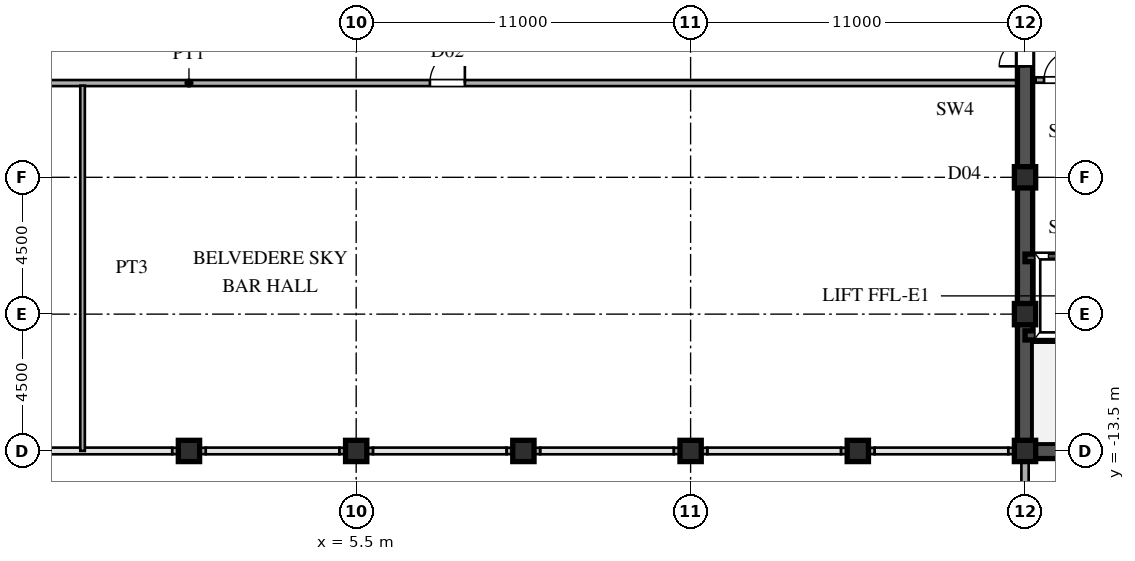
"""IFC4 building model, lengths in metres.
Left out: names, types, materials, properties, quantities, classifications, styles, units other than length and angle.
Written with IfcOpenShell. Run it as: python <this file> out.ifc"""

import sys

from ifc_helpers import new_model, si_unit, direction, frame, frame_2d, origin, origin_2d, place, context, subcontext, project, spatial, rectangle, hollow_rectangle, extrude, source, transform, mapped, element, fill, save


model = new_model("IFC4")
c1 = context("Model", 3, precision=1e-05, world=origin(), true_north=direction((0.0, 1.0)))
c2 = subcontext(c1, "Body", "Model", "MODEL_VIEW")
j1 = project(units=[si_unit("LENGTHUNIT", "METRE"), si_unit("PLANEANGLEUNIT", "RADIAN")], contexts=[c1])
p1 = place(None, origin())
s1 = spatial("IfcSite", under=j1, at=p1, CompositionType="ELEMENT")
p2 = place(p1, origin())
s2 = spatial("IfcBuilding", under=s1, at=p2, CompositionType="ELEMENT")
p3 = place(p2, frame((0.0, 0.0, 274.2)))
s3 = spatial("IfcBuildingStorey", under=s2, at=p3, CompositionType="ELEMENT", Elevation=274.2)
m1 = source(origin(), c2, "Body", "SweptSolid", [
    extrude(hollow_rectangle(XDim=0.7, YDim=0.7, WallThickness=0.03, at=origin_2d()), origin(), (0.0, 0.0, 1.0), 4.8),
])
for number, where, z_axis, x_axis in (
    (1, (27.5, -13.5, 0.0), (0.0, 0.0, 1.0), (1.0, 0.0, 0.0)),
    (2, (27.5, -9.0, 0.0), (0.0, 0.0, 1.0), (1.0, 0.0, 0.0)),
    (3, (27.5, -4.5, 0.0), (0.0, 0.0, 1.0), (1.0, 0.0, 0.0)),
    (4, (0.0, -13.5, 0.0), (0.0, 0.0, 1.0), (1.0, 0.0, 0.0)),
    (5, (5.5, -13.5, 0.0), (0.0, 0.0, 1.0), (1.0, 0.0, 0.0)),
    (6, (11.0, -13.5, 0.0), (0.0, 0.0, 1.0), (1.0, 0.0, 0.0)),
    (7, (16.5, -13.5, 0.0), (0.0, 0.0, 1.0), (1.0, 0.0, 0.0)),
    (8, (22.0, -13.5, 0.0), (0.0, 0.0, 1.0), (1.0, 0.0, 0.0)),
):
    element("IfcColumn", number, at=place(p3, frame(where, z_axis=z_axis, x_axis=x_axis)), inside=s3, PredefinedType="COLUMN", context=c2, shape_type="MappedRepresentation", body=[
        mapped(m1, transform((0.0, 0.0, 0.0), scale=1.0)),
    ])
p4 = place(p3, frame((27.5, -15.98, 0.0), z_axis=(0.0, 0.0, 1.0), x_axis=(0.0, 1.0, 0.0)))
e9 = element("IfcWall", 9, at=p4, inside=s3, PredefinedType="SOLIDWALL", context=c2, shape_type="SweptSolid", body=[
    extrude(rectangle(XDim=1.605, YDim=0.24, at=frame_2d((0.803, 0.0))), origin(), (0.0, 0.0, 1.0), 4.52),
])
p5 = place(p3, frame((27.5, -14.375, 0.0), z_axis=(0.0, 0.0, 1.0), x_axis=(0.0, 1.0, 0.0)))
e10 = element("IfcWall", 10, at=p5, inside=s3, PredefinedType="SOLIDWALL", context=c2, shape_type="SweptSolid", body=[
    extrude(rectangle(XDim=0.62, YDim=0.24, at=frame_2d((0.31, 0.0))), origin(), (0.0, 0.0, 1.0), 4.02),
])
for number, where, z_axis, x_axis in (
    (11, (-0.55, -13.5, 0.0), (0.0, 0.0, 1.0), (1.0, 0.0, 0.0)),
    (12, (4.95, -13.5, 0.0), (0.0, 0.0, 1.0), (1.0, 0.0, 0.0)),
    (13, (10.45, -13.5, 0.0), (0.0, 0.0, 1.0), (1.0, 0.0, 0.0)),
    (14, (15.95, -13.5, 0.0), (0.0, 0.0, 1.0), (1.0, 0.0, 0.0)),
    (15, (21.45, -13.5, 0.0), (0.0, 0.0, 1.0), (1.0, 0.0, 0.0)),
):
    element("IfcWall", number, at=place(p3, frame(where, z_axis=z_axis, x_axis=x_axis)), inside=s3, PredefinedType="SOLIDWALL", context=c2, shape_type="SweptSolid", body=[
        extrude(rectangle(XDim=1.1, YDim=0.21, at=frame_2d((0.55, 0.0))), origin(), (0.0, 0.0, 1.0), 4.02),
    ])
p6 = place(p3, frame((26.95, -13.5, 0.0), z_axis=(0.0, 0.0, 1.0), x_axis=(1.0, 0.0, 0.0)))
e16 = element("IfcWall", 16, at=p6, inside=s3, PredefinedType="SOLIDWALL", context=c2, shape_type="SweptSolid", body=[
    extrude(rectangle(XDim=0.54, YDim=0.21, at=frame_2d((0.27, 0.0))), origin(), (0.0, 0.0, 1.0), 4.02),
])
p7 = place(p3, frame((27.5, -13.5, 0.0), z_axis=(0.0, 0.0, 1.0), x_axis=(0.0, 1.0, 0.0)))
e17 = element("IfcWall", 17, at=p7, inside=s3, PredefinedType="SHEAR", context=c2, shape_type="SweptSolid", body=[
    extrude(rectangle(XDim=12.2, YDim=0.5, at=frame_2d((6.1, 0.0))), origin(), (0.0, 0.0, 1.0), 4.52),
])
p8 = place(p3, frame((27.5, -1.3, 0.0), z_axis=(0.0, 0.0, 1.0), x_axis=(0.0, 1.0, 0.0)))
e18 = element("IfcWall", 18, at=p8, inside=s3, PredefinedType="SHEAR", context=c2, shape_type="SweptSolid", body=[
    extrude(rectangle(XDim=2.6, YDim=0.5, at=frame_2d((1.3, 0.0))), origin(), (0.0, 0.0, 1.0), 4.52),
])
p9 = place(p8, frame((0.45, 0.0, 0.0)))
e19 = element("IfcOpeningElement", 19, at=p9, cuts=e18, PredefinedType="OPENING", context=c2, shape_type="SweptSolid", body=[
    extrude(rectangle(XDim=1.7, YDim=2.35, at=frame_2d((0.85, 1.175))), frame((0.0, 0.26, 0.0), z_axis=(0.0, -1.0, 0.0), x_axis=(1.0, 0.0, 0.0)), (0.0, 0.0, 1.0), 0.52),
])
p10 = place(p3, frame((27.5, -13.5, 0.0), z_axis=(0.0, 0.0, 1.0), x_axis=(1.0, 0.0, 0.0)))
e20 = element("IfcWall", 20, at=p10, inside=s3, PredefinedType="SHEAR", context=c2, shape_type="SweptSolid", body=[
    extrude(rectangle(XDim=9.0, YDim=0.5, at=frame_2d((4.5, 0.0))), origin(), (0.0, 0.0, 1.0), 4.52),
])
p11 = place(p3, frame((27.5, -9.7, 0.0), z_axis=(0.0, 0.0, 1.0), x_axis=(1.0, 0.0, 0.0)))
e21 = element("IfcWall", 21, at=p11, inside=s3, PredefinedType="SHEAR", context=c2, shape_type="SweptSolid", body=[
    extrude(rectangle(XDim=9.0, YDim=0.3, at=frame_2d((4.5, 0.0))), origin(), (0.0, 0.0, 1.0), 4.52),
])
p12 = place(p11, frame((7.3, 0.0, 0.0)))
e22 = element("IfcOpeningElement", 22, at=p12, cuts=e21, PredefinedType="OPENING", context=c2, shape_type="SweptSolid", body=[
    extrude(rectangle(XDim=1.1, YDim=2.2, at=frame_2d((0.55, 1.1))), frame((0.0, 0.16, 0.0), z_axis=(0.0, -1.0, 0.0), x_axis=(1.0, 0.0, 0.0)), (0.0, 0.0, 1.0), 0.32),
])
p13 = place(p3, frame((27.5, -7.15, 0.0), z_axis=(0.0, 0.0, 1.0), x_axis=(1.0, 0.0, 0.0)))
e23 = element("IfcWall", 23, at=p13, inside=s3, PredefinedType="SHEAR", context=c2, shape_type="SweptSolid", body=[
    extrude(rectangle(XDim=2.8, YDim=0.25, at=frame_2d((1.4, 0.0))), origin(), (0.0, 0.0, 1.0), 4.52),
])
p14 = place(p3, frame((27.85, -1.3, 0.0), z_axis=(0.0, 0.0, 1.0), x_axis=(1.0, 0.0, 0.0)))
e24 = element("IfcWall", 24, at=p14, inside=s3, PredefinedType="PARTITIONING", context=c2, shape_type="SweptSolid", body=[
    extrude(rectangle(XDim=2.45, YDim=0.18, at=frame_2d((1.225, 0.0))), origin(), (0.0, 0.0, 1.0), 4.52),
])
p15 = place(p14, frame((0.275, 0.0, 0.0)))
e25 = element("IfcOpeningElement", 25, at=p15, cuts=e24, PredefinedType="OPENING", context=c2, shape_type="SweptSolid", body=[
    extrude(rectangle(XDim=0.95, YDim=2.15, at=frame_2d((0.475, 1.075))), frame((0.0, 0.1, 0.0), z_axis=(0.0, -1.0, 0.0), x_axis=(1.0, 0.0, 0.0)), (0.0, 0.0, 1.0), 0.2),
])
p16 = place(p3, frame((-27.245, -1.4, 0.0), z_axis=(0.0, 0.0, 1.0), x_axis=(1.0, 0.0, 0.0)))
e26 = element("IfcWall", 26, at=p16, inside=s3, PredefinedType="PARTITIONING", context=c2, shape_type="SweptSolid", body=[
    extrude(rectangle(XDim=54.49, YDim=0.2, at=frame_2d((27.245, 0.0))), origin(), (0.0, 0.0, 1.0), 4.52),
])
p17 = place(p16, frame((17.67, 0.0, 0.0)))
e27 = element("IfcOpeningElement", 27, at=p17, cuts=e26, PredefinedType="OPENING", context=c2, shape_type="SweptSolid", body=[
    extrude(rectangle(XDim=1.15, YDim=2.2, at=frame_2d((0.575, 1.1))), frame((0.0, 0.11, 0.0), z_axis=(0.0, -1.0, 0.0), x_axis=(1.0, 0.0, 0.0)), (0.0, 0.0, 1.0), 0.22),
])
p18 = place(p16, frame((35.17, 0.0, 0.0)))
e28 = element("IfcOpeningElement", 28, at=p18, cuts=e26, PredefinedType="OPENING", context=c2, shape_type="SweptSolid", body=[
    extrude(rectangle(XDim=1.15, YDim=2.2, at=frame_2d((0.575, 1.1))), frame((0.0, 0.11, 0.0), z_axis=(0.0, -1.0, 0.0), x_axis=(1.0, 0.0, 0.0)), (0.0, 0.0, 1.0), 0.22),
])
p19 = place(p3, frame((-3.5, -13.5, 0.0), z_axis=(0.0, 0.0, 1.0), x_axis=(0.0, 1.0, 0.0)))
e29 = element("IfcWall", 29, at=p19, inside=s3, PredefinedType="PARTITIONING", context=c2, shape_type="SweptSolid", body=[
    extrude(rectangle(XDim=12.015, YDim=0.15, at=frame_2d((6.007, 0.0))), origin(), (0.0, 0.0, 1.0), 4.52),
])
m2 = source(origin(), c2, "Body", "SweptSolid", [
    extrude(rectangle(XDim=1.7, YDim=2.35, at=frame_2d((0.85, 1.175))), frame((0.0, 0.025, 0.0), z_axis=(0.0, -1.0, 0.0), x_axis=(1.0, 0.0, 0.0)), (0.0, 0.0, 1.0), 0.05),
])
p20 = place(p9, origin())
e30 = element("IfcDoor", 30, at=p20, inside=s3, OperationType="DOUBLE_SWING_LEFT", PredefinedType="DOOR", context=c2, shape_type="MappedRepresentation", body=[
    mapped(m2, transform((0.0, 0.0, 0.0), scale=1.0)),
])
fill(e19, e30)
m3 = source(origin(), c2, "Body", "SweptSolid", [
    extrude(rectangle(XDim=0.95, YDim=2.15, at=frame_2d((0.475, 1.075))), frame((0.0, 0.025, 0.0), z_axis=(0.0, -1.0, 0.0), x_axis=(1.0, 0.0, 0.0)), (0.0, 0.0, 1.0), 0.05),
])
p21 = place(p15, origin())
e31 = element("IfcDoor", 31, at=p21, inside=s3, OperationType="SINGLE_SWING_RIGHT", PredefinedType="DOOR", context=c2, shape_type="MappedRepresentation", body=[
    mapped(m3, transform((0.0, 0.0, 0.0), scale=1.0)),
])
fill(e25, e31)
m4 = source(origin(), c2, "Body", "SweptSolid", [
    extrude(rectangle(XDim=1.15, YDim=2.2, at=frame_2d((0.575, 1.1))), frame((0.0, 0.025, 0.0), z_axis=(0.0, -1.0, 0.0), x_axis=(1.0, 0.0, 0.0)), (0.0, 0.0, 1.0), 0.05),
])
p22 = place(p18, origin())
e32 = element("IfcDoor", 32, at=p22, inside=s3, OperationType="SINGLE_SWING_RIGHT", PredefinedType="DOOR", context=c2, shape_type="MappedRepresentation", body=[
    mapped(m4, transform((0.0, 0.0, 0.0), scale=1.0)),
])
fill(e28, e32)
save(model, sys.argv[1])
